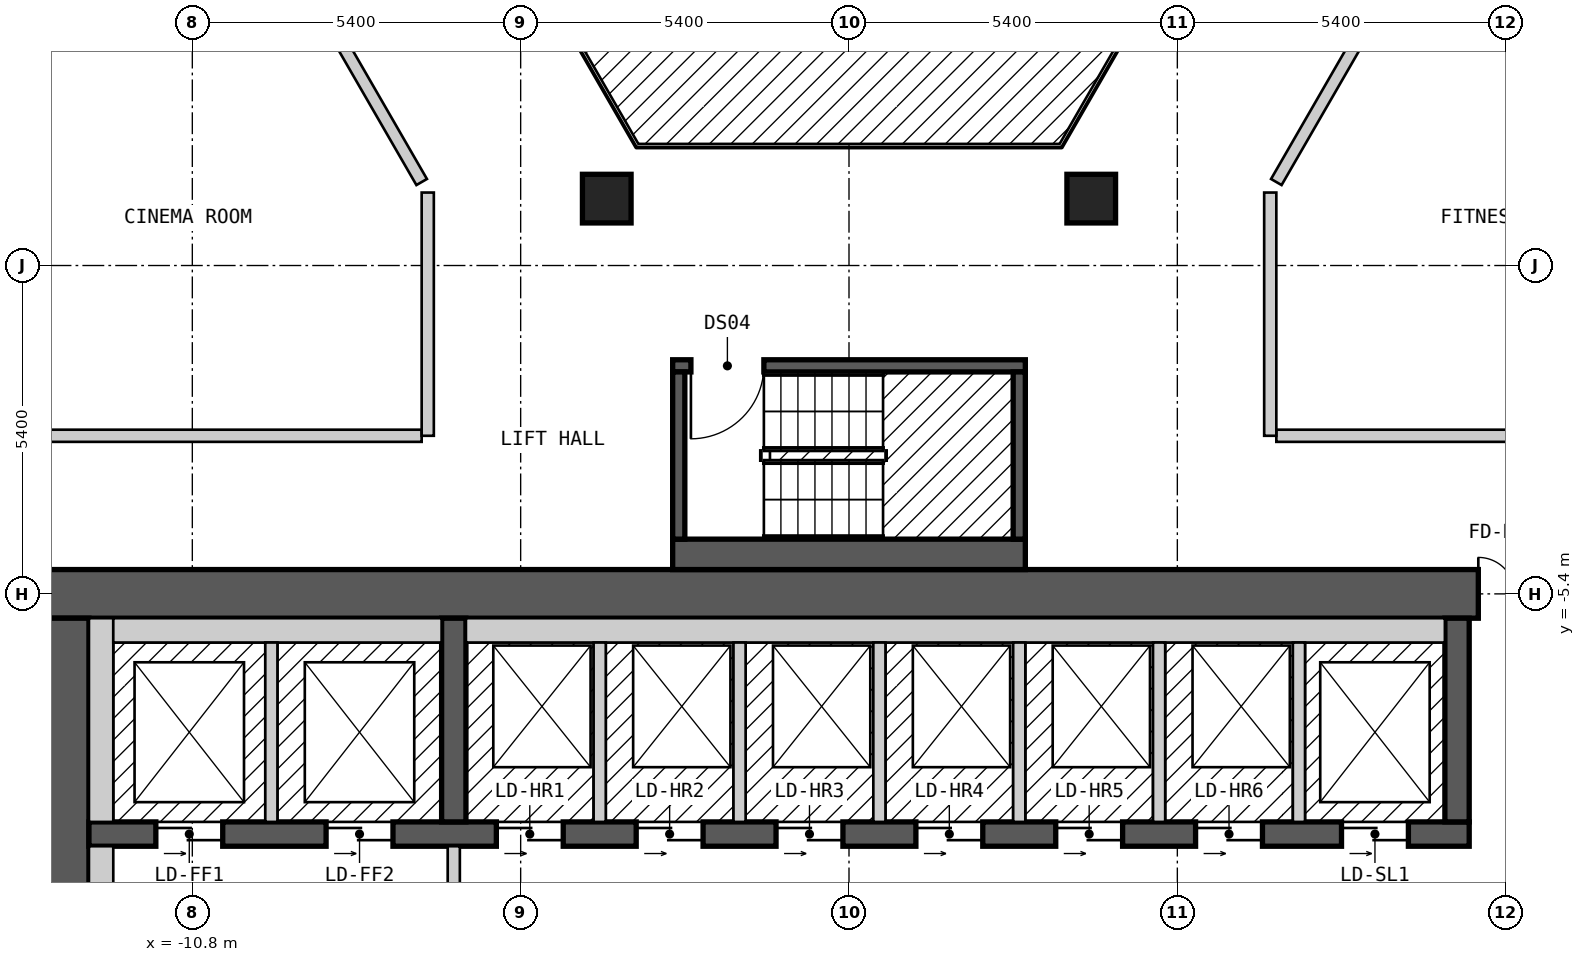
"""IFC4 building model, lengths in metres.
Left out: names, types, materials, properties, quantities, classifications, styles, units other than length and angle.
Written with IfcOpenShell. Run it as: python <this file> out.ifc"""

import sys

from ifc_helpers import new_model, si_unit, direction, frame, frame_2d, origin, origin_2d, place, context, subcontext, project, spatial, rectangle, extrude, element, fill, save


model = new_model("IFC4")
c1 = context("Model", 3, precision=1e-05, world=origin(), true_north=direction((0.0, 1.0)))
c2 = subcontext(c1, "Body", "Model", "MODEL_VIEW")
j1 = project(units=[si_unit("LENGTHUNIT", "METRE"), si_unit("PLANEANGLEUNIT", "RADIAN")], contexts=[c1])
p1 = place(None, origin())
s1 = spatial("IfcSite", under=j1, at=p1, CompositionType="ELEMENT")
p2 = place(p1, origin())
s2 = spatial("IfcBuilding", under=s1, at=p2, CompositionType="ELEMENT")
p3 = place(p2, frame((0.0, 0.0, 150.6)))
s3 = spatial("IfcBuildingStorey", under=s2, at=p3, CompositionType="ELEMENT", Elevation=150.6)
for number, where, z_axis, x_axis in (
    (1, (3.984, 1.1, 0.0), (0.0, 0.0, 1.0), (1.0, 0.0, 0.0)),
    (2, (-3.984, 1.1, 0.0), (0.0, 0.0, 1.0), (1.0, 0.0, 0.0)),
):
    element("IfcColumn", number, at=place(p3, frame(where, z_axis=z_axis, x_axis=x_axis)), inside=s3, PredefinedType="COLUMN", context=c2, shape_type="SweptSolid", body=[
        extrude(rectangle(XDim=0.8, YDim=0.8, at=origin_2d()), origin(), (0.0, 0.0, 1.0), 3.0),
    ])
p4 = place(p3, frame((-13.3, -5.4, 0.0), z_axis=(0.0, 0.0, 1.0), x_axis=(1.0, 0.0, 0.0)))
e3 = element("IfcWall", 3, at=p4, inside=s3, PredefinedType="SHEAR", context=c2, shape_type="SweptSolid", body=[
    extrude(rectangle(XDim=26.6, YDim=0.8, at=frame_2d((13.3, 0.0))), origin(), (0.0, 0.0, 1.0), 2.6),
])
p5 = place(p4, frame((23.65, 0.0, 0.0)))
e4 = element("IfcOpeningElement", 4, at=p5, cuts=e3, PredefinedType="OPENING", context=c2, shape_type="SweptSolid", body=[
    extrude(rectangle(XDim=1.2, YDim=2.1, at=frame_2d((0.6, 1.05))), frame((0.0, 0.41, 0.0), z_axis=(0.0, -1.0, 0.0), x_axis=(1.0, 0.0, 0.0)), (0.0, 0.0, 1.0), 0.82),
])
p6 = place(p3, frame((-12.9, -18.2, 0.0), z_axis=(0.0, 0.0, 1.0), x_axis=(0.0, 1.0, 0.0)))
e5 = element("IfcWall", 5, at=p6, inside=s3, PredefinedType="SHEAR", context=c2, shape_type="SweptSolid", body=[
    extrude(rectangle(XDim=12.4, YDim=0.8, at=frame_2d((6.2, 0.0))), origin(), (0.0, 0.0, 1.0), 2.6),
])
p7 = place(p6, frame((4.0, 0.0, 0.0)))
e6 = element("IfcOpeningElement", 6, at=p7, cuts=e5, PredefinedType="OPENING", context=c2, shape_type="SweptSolid", body=[
    extrude(rectangle(XDim=1.2, YDim=2.1, at=frame_2d((0.6, 1.05))), frame((0.0, 0.41, 0.0), z_axis=(0.0, -1.0, 0.0), x_axis=(1.0, 0.0, 0.0)), (0.0, 0.0, 1.0), 0.82),
])
p8 = place(p3, frame((-12.5, -9.35, 0.0), z_axis=(0.0, 0.0, 1.0), x_axis=(1.0, 0.0, 0.0)))
e7 = element("IfcWall", 7, at=p8, inside=s3, PredefinedType="SHEAR", context=c2, shape_type="SweptSolid", body=[
    extrude(rectangle(XDim=22.7, YDim=0.4, at=frame_2d((11.35, 0.0))), origin(), (0.0, 0.0, 1.0), 2.6),
])
p9 = place(p8, frame((1.1, 0.0, 0.0)))
e8 = element("IfcOpeningElement", 8, at=p9, cuts=e7, PredefinedType="OPENING", context=c2, shape_type="SweptSolid", body=[
    extrude(rectangle(XDim=1.1, YDim=2.1, at=frame_2d((0.55, 1.05))), frame((0.0, 0.21, 0.0), z_axis=(0.0, -1.0, 0.0), x_axis=(1.0, 0.0, 0.0)), (0.0, 0.0, 1.0), 0.42),
])
p10 = place(p8, frame((3.9, 0.0, 0.0)))
e9 = element("IfcOpeningElement", 9, at=p10, cuts=e7, PredefinedType="OPENING", context=c2, shape_type="SweptSolid", body=[
    extrude(rectangle(XDim=1.1, YDim=2.1, at=frame_2d((0.55, 1.05))), frame((0.0, 0.21, 0.0), z_axis=(0.0, -1.0, 0.0), x_axis=(1.0, 0.0, 0.0)), (0.0, 0.0, 1.0), 0.42),
])
p11 = place(p8, frame((6.7, 0.0, 0.0)))
e10 = element("IfcOpeningElement", 10, at=p11, cuts=e7, PredefinedType="OPENING", context=c2, shape_type="SweptSolid", body=[
    extrude(rectangle(XDim=1.1, YDim=2.1, at=frame_2d((0.55, 1.05))), frame((0.0, 0.21, 0.0), z_axis=(0.0, -1.0, 0.0), x_axis=(1.0, 0.0, 0.0)), (0.0, 0.0, 1.0), 0.42),
])
p12 = place(p8, frame((9.0, 0.0, 0.0)))
e11 = element("IfcOpeningElement", 11, at=p12, cuts=e7, PredefinedType="OPENING", context=c2, shape_type="SweptSolid", body=[
    extrude(rectangle(XDim=1.1, YDim=2.1, at=frame_2d((0.55, 1.05))), frame((0.0, 0.21, 0.0), z_axis=(0.0, -1.0, 0.0), x_axis=(1.0, 0.0, 0.0)), (0.0, 0.0, 1.0), 0.42),
])
p13 = place(p8, frame((11.3, 0.0, 0.0)))
e12 = element("IfcOpeningElement", 12, at=p13, cuts=e7, PredefinedType="OPENING", context=c2, shape_type="SweptSolid", body=[
    extrude(rectangle(XDim=1.1, YDim=2.1, at=frame_2d((0.55, 1.05))), frame((0.0, 0.21, 0.0), z_axis=(0.0, -1.0, 0.0), x_axis=(1.0, 0.0, 0.0)), (0.0, 0.0, 1.0), 0.42),
])
p14 = place(p8, frame((13.6, 0.0, 0.0)))
e13 = element("IfcOpeningElement", 13, at=p14, cuts=e7, PredefinedType="OPENING", context=c2, shape_type="SweptSolid", body=[
    extrude(rectangle(XDim=1.1, YDim=2.1, at=frame_2d((0.55, 1.05))), frame((0.0, 0.21, 0.0), z_axis=(0.0, -1.0, 0.0), x_axis=(1.0, 0.0, 0.0)), (0.0, 0.0, 1.0), 0.42),
])
p15 = place(p8, frame((15.9, 0.0, 0.0)))
e14 = element("IfcOpeningElement", 14, at=p15, cuts=e7, PredefinedType="OPENING", context=c2, shape_type="SweptSolid", body=[
    extrude(rectangle(XDim=1.1, YDim=2.1, at=frame_2d((0.55, 1.05))), frame((0.0, 0.21, 0.0), z_axis=(0.0, -1.0, 0.0), x_axis=(1.0, 0.0, 0.0)), (0.0, 0.0, 1.0), 0.42),
])
p16 = place(p8, frame((18.2, 0.0, 0.0)))
e15 = element("IfcOpeningElement", 15, at=p16, cuts=e7, PredefinedType="OPENING", context=c2, shape_type="SweptSolid", body=[
    extrude(rectangle(XDim=1.1, YDim=2.1, at=frame_2d((0.55, 1.05))), frame((0.0, 0.21, 0.0), z_axis=(0.0, -1.0, 0.0), x_axis=(1.0, 0.0, 0.0)), (0.0, 0.0, 1.0), 0.42),
])
p17 = place(p8, frame((20.6, 0.0, 0.0)))
e16 = element("IfcOpeningElement", 16, at=p17, cuts=e7, PredefinedType="OPENING", context=c2, shape_type="SweptSolid", body=[
    extrude(rectangle(XDim=1.1, YDim=2.1, at=frame_2d((0.55, 1.05))), frame((0.0, 0.21, 0.0), z_axis=(0.0, -1.0, 0.0), x_axis=(1.0, 0.0, 0.0)), (0.0, 0.0, 1.0), 0.42),
])
for number, where, z_axis, x_axis in (
    (17, (-6.5, -9.15, 0.0), (0.0, 0.0, 1.0), (0.0, 1.0, 0.0)),
    (18, (10.0, -9.15, 0.0), (0.0, 0.0, 1.0), (0.0, 1.0, 0.0)),
):
    element("IfcWall", number, at=place(p3, frame(where, z_axis=z_axis, x_axis=x_axis)), inside=s3, PredefinedType="SHEAR", context=c2, shape_type="SweptSolid", body=[
        extrude(rectangle(XDim=3.35, YDim=0.4, at=frame_2d((1.675, 0.0))), origin(), (0.0, 0.0, 1.0), 2.6),
    ])
p18 = place(p3, frame((-2.9, -4.75, 0.0), z_axis=(0.0, 0.0, 1.0), x_axis=(1.0, 0.0, 0.0)))
e19 = element("IfcWall", 19, at=p18, inside=s3, PredefinedType="SOLIDWALL", context=c2, shape_type="SweptSolid", body=[
    extrude(rectangle(XDim=5.8, YDim=0.5, at=frame_2d((2.9, 0.0))), origin(), (0.0, 0.0, 1.0), 2.6),
])
p19 = place(p3, frame((-2.9, -1.65, 0.0), z_axis=(0.0, 0.0, 1.0), x_axis=(1.0, 0.0, 0.0)))
e20 = element("IfcWall", 20, at=p19, inside=s3, PredefinedType="SOLIDWALL", context=c2, shape_type="SweptSolid", body=[
    extrude(rectangle(XDim=5.8, YDim=0.2, at=frame_2d((2.9, 0.0))), origin(), (0.0, 0.0, 1.0), 2.6),
])
p20 = place(p19, frame((0.3, 0.0, 0.0)))
e21 = element("IfcOpeningElement", 21, at=p20, cuts=e20, PredefinedType="OPENING", context=c2, shape_type="SweptSolid", body=[
    extrude(rectangle(XDim=1.2, YDim=2.1, at=frame_2d((0.6, 1.05))), frame((0.0, 0.11, 0.0), z_axis=(0.0, -1.0, 0.0), x_axis=(1.0, 0.0, 0.0)), (0.0, 0.0, 1.0), 0.22),
])
for number, where, z_axis, x_axis in (
    (22, (-2.8, -4.5, 0.0), (0.0, 0.0, 1.0), (0.0, 1.0, 0.0)),
    (23, (2.8, -4.5, 0.0), (0.0, 0.0, 1.0), (0.0, 1.0, 0.0)),
):
    element("IfcWall", number, at=place(p3, frame(where, z_axis=z_axis, x_axis=x_axis)), inside=s3, PredefinedType="SOLIDWALL", context=c2, shape_type="SweptSolid", body=[
        extrude(rectangle(XDim=2.75, YDim=0.2, at=frame_2d((1.375, 0.0))), origin(), (0.0, 0.0, 1.0), 2.6),
    ])
p21 = place(p3, frame((-10.796, 7.9, 0.0), z_axis=(0.0, 0.0, 1.0), x_axis=(0.499954271211, -0.866051803703, 0.0)))
e24 = element("IfcWall", 24, at=p21, inside=s3, PredefinedType="PARTITIONING", context=c2, shape_type="SweptSolid", body=[
    extrude(rectangle(XDim=7.536, YDim=0.2, at=frame_2d((3.768, 0.0))), origin(), (0.0, 0.0, 1.0), 2.6),
])
p22 = place(p3, frame((7.967, 13.0, 0.0), z_axis=(0.0, 0.0, 1.0), x_axis=(0.50003774998, -0.866003607726, 0.0)))
e25 = element("IfcWall", 25, at=p22, inside=s3, PredefinedType="PARTITIONING", context=c2, shape_type="SweptSolid", body=[
    extrude(rectangle(XDim=14.433, YDim=0.2, at=frame_2d((7.217, 0.0))), origin(), (0.0, 0.0, 1.0), 2.6),
])
p23 = place(p22, frame((6.824, 0.0, 0.0)))
e26 = element("IfcOpeningElement", 26, at=p23, cuts=e25, PredefinedType="OPENING", context=c2, shape_type="SweptSolid", body=[
    extrude(rectangle(XDim=0.9, YDim=2.1, at=frame_2d((0.45, 1.05))), frame((0.0, 0.11, 0.0), z_axis=(0.0, -1.0, 0.0), x_axis=(1.0, 0.0, 0.0)), (0.0, 0.0, 1.0), 0.22),
])
p24 = place(p3, frame((9.296, 15.1, 0.0), z_axis=(0.0, 0.0, 1.0), x_axis=(0.499974024244, -0.866040400375, 0.0)))
e27 = element("IfcWall", 27, at=p24, inside=s3, PredefinedType="PARTITIONING", context=c2, shape_type="SweptSolid", body=[
    extrude(rectangle(XDim=16.857, YDim=0.2, at=frame_2d((8.429, 0.0))), origin(), (0.0, 0.0, 1.0), 2.6),
])
p25 = place(p24, frame((11.522, 0.0, 0.0)))
e28 = element("IfcOpeningElement", 28, at=p25, cuts=e27, PredefinedType="OPENING", context=c2, shape_type="SweptSolid", body=[
    extrude(rectangle(XDim=1.0, YDim=2.1, at=frame_2d((0.5, 1.05))), frame((0.0, 0.11, 0.0), z_axis=(0.0, -1.0, 0.0), x_axis=(1.0, 0.0, 0.0)), (0.0, 0.0, 1.0), 0.22),
])
p26 = place(p3, frame((-13.395, -2.8, 0.0), z_axis=(0.0, 0.0, 1.0), x_axis=(1.0, 0.0, 0.0)))
e29 = element("IfcWall", 29, at=p26, inside=s3, PredefinedType="PARTITIONING", context=c2, shape_type="SweptSolid", body=[
    extrude(rectangle(XDim=6.367, YDim=0.2, at=frame_2d((3.184, 0.0))), origin(), (0.0, 0.0, 1.0), 2.6),
])
p27 = place(p3, frame((7.028, -2.8, 0.0), z_axis=(0.0, 0.0, 1.0), x_axis=(1.0, 0.0, 0.0)))
e30 = element("IfcWall", 30, at=p27, inside=s3, PredefinedType="PARTITIONING", context=c2, shape_type="SweptSolid", body=[
    extrude(rectangle(XDim=6.25, YDim=0.2, at=frame_2d((3.125, 0.0))), origin(), (0.0, 0.0, 1.0), 2.6),
])
p28 = place(p3, frame((7.028, 1.373, 0.0), z_axis=(0.0, 0.0, 1.0), x_axis=(0.499954271211, 0.866051803703, 0.0)))
e31 = element("IfcWall", 31, at=p28, inside=s3, PredefinedType="PARTITIONING", context=c2, shape_type="SweptSolid", body=[
    extrude(rectangle(XDim=7.536, YDim=0.2, at=frame_2d((3.768, 0.0))), origin(), (0.0, 0.0, 1.0), 2.6),
])
p29 = place(p3, frame((-15.242, 0.399, 0.0), z_axis=(0.0, 0.0, 1.0), x_axis=(0.499953615651, 0.866052182145, 0.0)))
e32 = element("IfcWall", 32, at=p29, inside=s3, PredefinedType="PARTITIONING", context=c2, shape_type="SweptSolid", body=[
    extrude(rectangle(XDim=8.777, YDim=0.2, at=frame_2d((4.388, 0.0))), origin(), (0.0, 0.0, 1.0), 2.6),
])
p30 = place(p29, frame((3.938, 0.0, 0.0)))
e33 = element("IfcOpeningElement", 33, at=p30, cuts=e32, PredefinedType="OPENING", context=c2, shape_type="SweptSolid", body=[
    extrude(rectangle(XDim=0.9, YDim=2.1, at=frame_2d((0.45, 1.05))), frame((0.0, 0.11, 0.0), z_axis=(0.0, -1.0, 0.0), x_axis=(1.0, 0.0, 0.0)), (0.0, 0.0, 1.0), 0.22),
])
p31 = place(p3, frame((-17.724, 0.5, 0.0), z_axis=(0.0, 0.0, 1.0), x_axis=(0.499992388462, 0.866029798263, 0.0)))
e34 = element("IfcWall", 34, at=p31, inside=s3, PredefinedType="PARTITIONING", context=c2, shape_type="SweptSolid", body=[
    extrude(rectangle(XDim=16.859, YDim=0.2, at=frame_2d((8.429, 0.0))), origin(), (0.0, 0.0, 1.0), 2.6),
])
p32 = place(p31, frame((10.672, 0.0, 0.0)))
e35 = element("IfcOpeningElement", 35, at=p32, cuts=e34, PredefinedType="OPENING", context=c2, shape_type="SweptSolid", body=[
    extrude(rectangle(XDim=1.0, YDim=2.1, at=frame_2d((0.5, 1.05))), frame((0.0, 0.11, 0.0), z_axis=(0.0, -1.0, 0.0), x_axis=(1.0, 0.0, 0.0)), (0.0, 0.0, 1.0), 0.22),
])
for number, where, z_axis, x_axis in (
    (36, (6.928, -2.8, 0.0), (0.0, 0.0, 1.0), (0.0, 1.0, 0.0)),
    (37, (-6.928, -2.8, 0.0), (0.0, 0.0, 1.0), (0.0, 1.0, 0.0)),
):
    element("IfcWall", number, at=place(p3, frame(where, z_axis=z_axis, x_axis=x_axis)), inside=s3, PredefinedType="PARTITIONING", context=c2, shape_type="SweptSolid", body=[
        extrude(rectangle(XDim=4.0, YDim=0.2, at=frame_2d((2.0, 0.0))), origin(), (0.0, 0.0, 1.0), 2.6),
    ])
p33 = place(p3, frame((-22.398, 0.499, 0.0), z_axis=(0.0, 0.0, 1.0), x_axis=(0.499981561717, 0.866036048871, 0.0)))
e38 = element("IfcWall", 38, at=p33, inside=s3, PredefinedType="PARTITIONING", context=c2, shape_type="SweptSolid", body=[
    extrude(rectangle(XDim=21.532, YDim=0.1, at=frame_2d((10.766, 0.0))), origin(), (0.0, 0.0, 1.0), 2.6),
])
p34 = place(p33, frame((13.049, 0.0, 0.0)))
e39 = element("IfcOpeningElement", 39, at=p34, cuts=e38, PredefinedType="OPENING", context=c2, shape_type="SweptSolid", body=[
    extrude(rectangle(XDim=0.9, YDim=2.1, at=frame_2d((0.45, 1.05))), frame((0.0, 0.06, 0.0), z_axis=(0.0, -1.0, 0.0), x_axis=(1.0, 0.0, 0.0)), (0.0, 0.0, 1.0), 0.12),
])
p35 = place(p33, frame((2.183, 0.0, 0.0)))
e40 = element("IfcOpeningElement", 40, at=p35, cuts=e38, PredefinedType="OPENING", context=c2, shape_type="SweptSolid", body=[
    extrude(rectangle(XDim=0.8, YDim=2.1, at=frame_2d((0.4, 1.05))), frame((0.0, 0.06, 0.0), z_axis=(0.0, -1.0, 0.0), x_axis=(1.0, 0.0, 0.0)), (0.0, 0.0, 1.0), 0.12),
])
p36 = place(p3, frame((-12.3, -13.0, 0.0), z_axis=(0.0, 0.0, 1.0), x_axis=(0.0, 1.0, 0.0)))
e41 = element("IfcWall", 41, at=p36, inside=s3, PredefinedType="PARTITIONING", context=c2, shape_type="SweptSolid", body=[
    extrude(rectangle(XDim=3.45, YDim=0.4, at=frame_2d((1.725, 0.0))), origin(), (0.0, 0.0, 1.0), 2.6),
])
p37 = place(p3, frame((-12.3, -9.15, 0.0), z_axis=(0.0, 0.0, 1.0), x_axis=(0.0, 1.0, 0.0)))
e42 = element("IfcWall", 42, at=p37, inside=s3, PredefinedType="SOLIDWALL", context=c2, shape_type="SweptSolid", body=[
    extrude(rectangle(XDim=3.35, YDim=0.4, at=frame_2d((1.675, 0.0))), origin(), (0.0, 0.0, 1.0), 2.6),
])
p38 = place(p3, frame((-12.1, -6.0, 0.0), z_axis=(0.0, 0.0, 1.0), x_axis=(1.0, 0.0, 0.0)))
e43 = element("IfcWall", 43, at=p38, inside=s3, PredefinedType="SOLIDWALL", context=c2, shape_type="SweptSolid", body=[
    extrude(rectangle(XDim=5.4, YDim=0.4, at=frame_2d((2.7, 0.0))), origin(), (0.0, 0.0, 1.0), 2.6),
])
p39 = place(p3, frame((-9.5, -9.15, 0.0), z_axis=(0.0, 0.0, 1.0), x_axis=(0.0, 1.0, 0.0)))
e44 = element("IfcWall", 44, at=p39, inside=s3, PredefinedType="SOLIDWALL", context=c2, shape_type="SweptSolid", body=[
    extrude(rectangle(XDim=2.95, YDim=0.2, at=frame_2d((1.475, 0.0))), origin(), (0.0, 0.0, 1.0), 2.6),
])
p40 = place(p3, frame((-6.5, -14.45, 0.0), z_axis=(0.0, 0.0, 1.0), x_axis=(0.0, 1.0, 0.0)))
e45 = element("IfcWall", 45, at=p40, inside=s3, PredefinedType="PARTITIONING", context=c2, shape_type="SweptSolid", body=[
    extrude(rectangle(XDim=4.9, YDim=0.2, at=frame_2d((2.45, 0.0))), origin(), (0.0, 0.0, 1.0), 2.6),
])
p41 = place(p40, frame((3.15, 0.0, 0.0), z_axis=(0.0, 0.0, 1.0), x_axis=(-1.0, 0.0, 0.0)))
e46 = element("IfcOpeningElement", 46, at=p41, cuts=e45, PredefinedType="OPENING", context=c2, shape_type="SweptSolid", body=[
    extrude(rectangle(XDim=1.4, YDim=2.1, at=frame_2d((0.7, 1.05))), frame((0.0, 0.11, 0.0), z_axis=(0.0, -1.0, 0.0), x_axis=(1.0, 0.0, 0.0)), (0.0, 0.0, 1.0), 0.22),
])
p42 = place(p3, frame((-6.3, -6.0, 0.0), z_axis=(0.0, 0.0, 1.0), x_axis=(1.0, 0.0, 0.0)))
e47 = element("IfcWall", 47, at=p42, inside=s3, PredefinedType="SOLIDWALL", context=c2, shape_type="SweptSolid", body=[
    extrude(rectangle(XDim=16.1, YDim=0.4, at=frame_2d((8.05, 0.0))), origin(), (0.0, 0.0, 1.0), 2.6),
])
for number, where, z_axis, x_axis in (
    (48, (-4.1, -9.15, 0.0), (0.0, 0.0, 1.0), (0.0, 1.0, 0.0)),
    (49, (-1.8, -9.15, 0.0), (0.0, 0.0, 1.0), (0.0, 1.0, 0.0)),
    (50, (0.5, -9.15, 0.0), (0.0, 0.0, 1.0), (0.0, 1.0, 0.0)),
    (51, (2.8, -9.15, 0.0), (0.0, 0.0, 1.0), (0.0, 1.0, 0.0)),
    (52, (5.1, -9.15, 0.0), (0.0, 0.0, 1.0), (0.0, 1.0, 0.0)),
    (53, (7.4, -9.15, 0.0), (0.0, 0.0, 1.0), (0.0, 1.0, 0.0)),
):
    element("IfcWall", number, at=place(p3, frame(where, z_axis=z_axis, x_axis=x_axis)), inside=s3, PredefinedType="SOLIDWALL", context=c2, shape_type="SweptSolid", body=[
        extrude(rectangle(XDim=2.95, YDim=0.2, at=frame_2d((1.475, 0.0))), origin(), (0.0, 0.0, 1.0), 2.6),
    ])
p43 = place(p20, origin())
e54 = element("IfcDoor", 54, at=p43, inside=s3, OperationType="SINGLE_SWING_LEFT", PredefinedType="DOOR", context=c2, shape_type="SweptSolid", body=[
    extrude(rectangle(XDim=1.2, YDim=2.1, at=frame_2d((0.6, 1.05))), frame((0.0, 0.025, 0.0), z_axis=(0.0, -1.0, 0.0), x_axis=(1.0, 0.0, 0.0)), (0.0, 0.0, 1.0), 0.05),
])
fill(e21, e54)
p44 = place(p9, origin())
e55 = element("IfcDoor", 55, at=p44, inside=s3, OperationType="DOUBLE_DOOR_SLIDING", PredefinedType="DOOR", context=c2, shape_type="SweptSolid", body=[
    extrude(rectangle(XDim=1.1, YDim=2.1, at=frame_2d((0.55, 1.05))), frame((0.0, 0.025, 0.0), z_axis=(0.0, -1.0, 0.0), x_axis=(1.0, 0.0, 0.0)), (0.0, 0.0, 1.0), 0.05),
])
fill(e8, e55)
p45 = place(p10, origin())
e56 = element("IfcDoor", 56, at=p45, inside=s3, OperationType="DOUBLE_DOOR_SLIDING", PredefinedType="DOOR", context=c2, shape_type="SweptSolid", body=[
    extrude(rectangle(XDim=1.1, YDim=2.1, at=frame_2d((0.55, 1.05))), frame((0.0, 0.025, 0.0), z_axis=(0.0, -1.0, 0.0), x_axis=(1.0, 0.0, 0.0)), (0.0, 0.0, 1.0), 0.05),
])
fill(e9, e56)
p46 = place(p11, origin())
e57 = element("IfcDoor", 57, at=p46, inside=s3, OperationType="DOUBLE_DOOR_SLIDING", PredefinedType="DOOR", context=c2, shape_type="SweptSolid", body=[
    extrude(rectangle(XDim=1.1, YDim=2.1, at=frame_2d((0.55, 1.05))), frame((0.0, 0.025, 0.0), z_axis=(0.0, -1.0, 0.0), x_axis=(1.0, 0.0, 0.0)), (0.0, 0.0, 1.0), 0.05),
])
fill(e10, e57)
p47 = place(p12, origin())
e58 = element("IfcDoor", 58, at=p47, inside=s3, OperationType="DOUBLE_DOOR_SLIDING", PredefinedType="DOOR", context=c2, shape_type="SweptSolid", body=[
    extrude(rectangle(XDim=1.1, YDim=2.1, at=frame_2d((0.55, 1.05))), frame((0.0, 0.025, 0.0), z_axis=(0.0, -1.0, 0.0), x_axis=(1.0, 0.0, 0.0)), (0.0, 0.0, 1.0), 0.05),
])
fill(e11, e58)
p48 = place(p13, origin())
e59 = element("IfcDoor", 59, at=p48, inside=s3, OperationType="DOUBLE_DOOR_SLIDING", PredefinedType="DOOR", context=c2, shape_type="SweptSolid", body=[
    extrude(rectangle(XDim=1.1, YDim=2.1, at=frame_2d((0.55, 1.05))), frame((0.0, 0.025, 0.0), z_axis=(0.0, -1.0, 0.0), x_axis=(1.0, 0.0, 0.0)), (0.0, 0.0, 1.0), 0.05),
])
fill(e12, e59)
p49 = place(p14, origin())
e60 = element("IfcDoor", 60, at=p49, inside=s3, OperationType="DOUBLE_DOOR_SLIDING", PredefinedType="DOOR", context=c2, shape_type="SweptSolid", body=[
    extrude(rectangle(XDim=1.1, YDim=2.1, at=frame_2d((0.55, 1.05))), frame((0.0, 0.025, 0.0), z_axis=(0.0, -1.0, 0.0), x_axis=(1.0, 0.0, 0.0)), (0.0, 0.0, 1.0), 0.05),
])
fill(e13, e60)
p50 = place(p15, origin())
e61 = element("IfcDoor", 61, at=p50, inside=s3, OperationType="DOUBLE_DOOR_SLIDING", PredefinedType="DOOR", context=c2, shape_type="SweptSolid", body=[
    extrude(rectangle(XDim=1.1, YDim=2.1, at=frame_2d((0.55, 1.05))), frame((0.0, 0.025, 0.0), z_axis=(0.0, -1.0, 0.0), x_axis=(1.0, 0.0, 0.0)), (0.0, 0.0, 1.0), 0.05),
])
fill(e14, e61)
p51 = place(p16, origin())
e62 = element("IfcDoor", 62, at=p51, inside=s3, OperationType="DOUBLE_DOOR_SLIDING", PredefinedType="DOOR", context=c2, shape_type="SweptSolid", body=[
    extrude(rectangle(XDim=1.1, YDim=2.1, at=frame_2d((0.55, 1.05))), frame((0.0, 0.025, 0.0), z_axis=(0.0, -1.0, 0.0), x_axis=(1.0, 0.0, 0.0)), (0.0, 0.0, 1.0), 0.05),
])
fill(e15, e62)
p52 = place(p17, origin())
e63 = element("IfcDoor", 63, at=p52, inside=s3, OperationType="DOUBLE_DOOR_SLIDING", PredefinedType="DOOR", context=c2, shape_type="SweptSolid", body=[
    extrude(rectangle(XDim=1.1, YDim=2.1, at=frame_2d((0.55, 1.05))), frame((0.0, 0.025, 0.0), z_axis=(0.0, -1.0, 0.0), x_axis=(1.0, 0.0, 0.0)), (0.0, 0.0, 1.0), 0.05),
])
fill(e16, e63)
p53 = place(p5, origin())
e64 = element("IfcDoor", 64, at=p53, inside=s3, OperationType="DOUBLE_DOOR_SINGLE_SWING", PredefinedType="DOOR", context=c2, shape_type="SweptSolid", body=[
    extrude(rectangle(XDim=1.2, YDim=2.1, at=frame_2d((0.6, 1.05))), frame((0.0, 0.025, 0.0), z_axis=(0.0, -1.0, 0.0), x_axis=(1.0, 0.0, 0.0)), (0.0, 0.0, 1.0), 0.05),
])
fill(e4, e64)
save(model, sys.argv[1])
